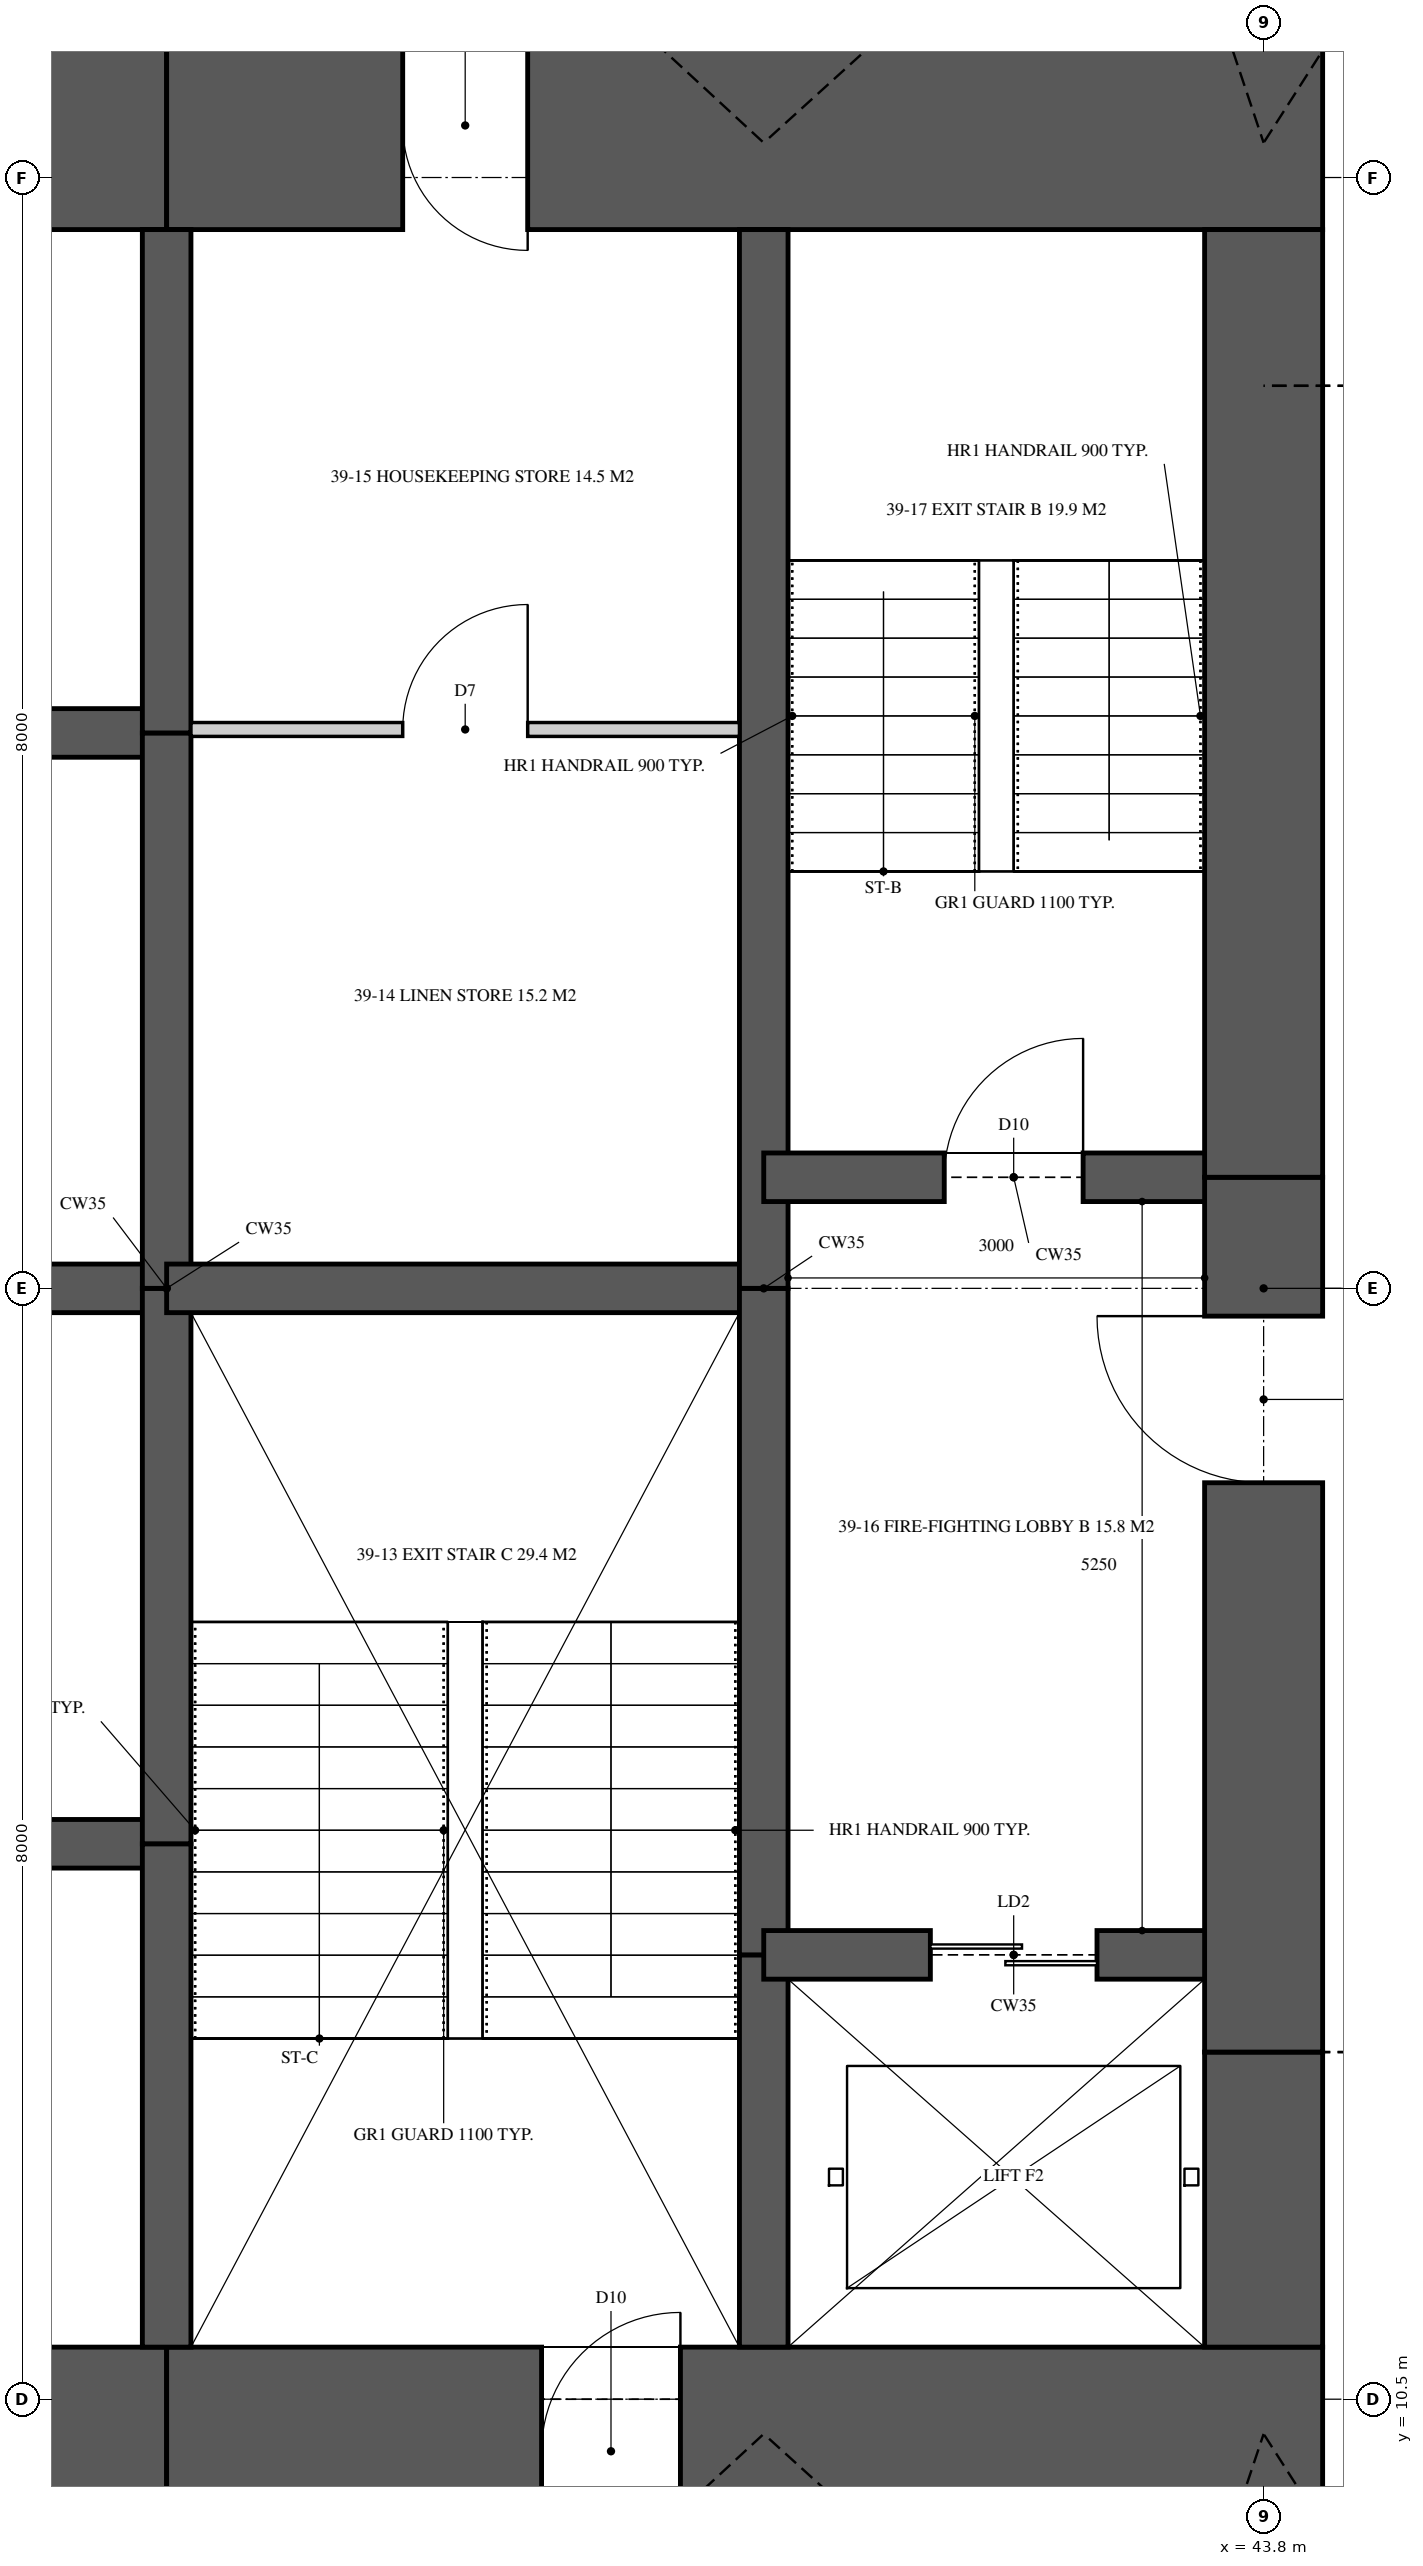
"""IFC4 building model, lengths in metres.
Left out: names, types, materials, properties, quantities, classifications, styles, units other than length and angle.
Written with IfcOpenShell. Run it as: python <this file> out.ifc"""

import sys

from ifc_helpers import new_model, si_unit, direction, frame, frame_2d, origin, place, context, subcontext, project, spatial, rectangle, extrude, element, fill, save


model = new_model("IFC4")
c1 = context("Model", 3, precision=1e-05, world=origin(), true_north=direction((0.0, 1.0)))
c2 = subcontext(c1, "Body", "Model", "MODEL_VIEW")
j1 = project(units=[si_unit("LENGTHUNIT", "METRE"), si_unit("PLANEANGLEUNIT", "RADIAN")], contexts=[c1])
p1 = place(None, origin())
s1 = spatial("IfcSite", under=j1, at=p1, CompositionType="ELEMENT")
p2 = place(p1, origin())
s2 = spatial("IfcBuilding", under=s1, at=p2, CompositionType="ELEMENT")
p3 = place(p2, frame((0.0, 0.0, 144.35)))
s3 = spatial("IfcBuildingStorey", under=s2, at=p3, CompositionType="ELEMENT", Elevation=144.35)
p4 = place(p3, frame((31.6, 10.125, 0.0), z_axis=(0.0, 0.0, 1.0), x_axis=(1.0, 0.0, 0.0)))
e1 = element("IfcWall", 1, at=p4, inside=s3, PredefinedType="SHEAR", context=c2, shape_type="SweptSolid", body=[
    extrude(rectangle(XDim=4.3, YDim=1.5, at=frame_2d((2.15, 0.0))), origin(), (0.0, 0.0, 1.0), 5.0),
])
p5 = place(p3, frame((35.9, 10.125, 0.0), z_axis=(0.0, 0.0, 1.0), x_axis=(1.0, 0.0, 0.0)))
e2 = element("IfcWall", 2, at=p5, inside=s3, PredefinedType="SHEAR", context=c2, shape_type="SweptSolid", body=[
    extrude(rectangle(XDim=8.325, YDim=1.5, at=frame_2d((4.163, 0.0))), origin(), (0.0, 0.0, 1.0), 5.0),
])
p6 = place(p5, frame((2.7, 0.0, 0.0)))
e3 = element("IfcOpeningElement", 3, at=p6, cuts=e2, PredefinedType="OPENING", context=c2, shape_type="SweptSolid", body=[
    extrude(rectangle(XDim=1.0, YDim=2.1, at=frame_2d((0.5, 1.05))), frame((0.0, 0.76, 0.0), z_axis=(0.0, -1.0, 0.0), x_axis=(1.0, 0.0, 0.0)), (0.0, 0.0, 1.0), 1.52),
])
p7 = place(p3, frame((44.225, 26.875, 0.0), z_axis=(0.0, 0.0, 1.0), x_axis=(-1.0, 0.0, 0.0)))
e4 = element("IfcWall", 4, at=p7, inside=s3, PredefinedType="SHEAR", context=c2, shape_type="SweptSolid", body=[
    extrude(rectangle(XDim=8.325, YDim=1.5, at=frame_2d((4.163, 0.0))), origin(), (0.0, 0.0, 1.0), 5.0),
])
p8 = place(p7, frame((5.725, 0.0, 0.0)))
e5 = element("IfcOpeningElement", 5, at=p8, cuts=e4, PredefinedType="OPENING", context=c2, shape_type="SweptSolid", body=[
    extrude(rectangle(XDim=0.9, YDim=2.1, at=frame_2d((0.45, 1.05))), frame((0.0, 0.76, 0.0), z_axis=(0.0, -1.0, 0.0), x_axis=(1.0, 0.0, 0.0)), (0.0, 0.0, 1.0), 1.52),
])
p9 = place(p3, frame((35.9, 26.875, 0.0), z_axis=(0.0, 0.0, 1.0), x_axis=(-1.0, 0.0, 0.0)))
e6 = element("IfcWall", 6, at=p9, inside=s3, PredefinedType="SHEAR", context=c2, shape_type="SweptSolid", body=[
    extrude(rectangle(XDim=4.3, YDim=1.5, at=frame_2d((2.15, 0.0))), origin(), (0.0, 0.0, 1.0), 5.0),
])
p10 = place(p3, frame((43.8, 10.875, 0.0), z_axis=(0.0, 0.0, 1.0), x_axis=(0.0, 1.0, 0.0)))
e7 = element("IfcWall", 7, at=p10, inside=s3, PredefinedType="SHEAR", context=c2, shape_type="SweptSolid", body=[
    extrude(rectangle(XDim=2.125, YDim=0.85, at=frame_2d((1.062, 0.0))), origin(), (0.0, 0.0, 1.0), 5.0),
])
p11 = place(p3, frame((43.8, 13.0, 0.0), z_axis=(0.0, 0.0, 1.0), x_axis=(0.0, 1.0, 0.0)))
e8 = element("IfcWall", 8, at=p11, inside=s3, PredefinedType="SHEAR", context=c2, shape_type="SweptSolid", body=[
    extrude(rectangle(XDim=6.3, YDim=0.85, at=frame_2d((3.15, 0.0))), origin(), (0.0, 0.0, 1.0), 5.0),
])
p12 = place(p11, frame((4.1, 0.0, 0.0)))
e9 = element("IfcOpeningElement", 9, at=p12, cuts=e8, PredefinedType="OPENING", context=c2, shape_type="SweptSolid", body=[
    extrude(rectangle(XDim=1.2, YDim=2.2, at=frame_2d((0.6, 1.1))), frame((0.0, 0.435, 0.0), z_axis=(0.0, -1.0, 0.0), x_axis=(1.0, 0.0, 0.0)), (0.0, 0.0, 1.0), 0.87),
])
p13 = place(p3, frame((43.8, 19.3, 0.0), z_axis=(0.0, 0.0, 1.0), x_axis=(0.0, 1.0, 0.0)))
e10 = element("IfcWall", 10, at=p13, inside=s3, PredefinedType="SHEAR", context=c2, shape_type="SweptSolid", body=[
    extrude(rectangle(XDim=6.825, YDim=0.85, at=frame_2d((3.413, 0.0))), origin(), (0.0, 0.0, 1.0), 5.0),
])
p14 = place(p3, frame((35.9, 10.875, 0.0), z_axis=(0.0, 0.0, 1.0), x_axis=(0.0, 1.0, 0.0)))
e11 = element("IfcWall", 11, at=p14, inside=s3, PredefinedType="SHEAR", context=c2, shape_type="SweptSolid", body=[
    extrude(rectangle(XDim=3.625, YDim=0.35, at=frame_2d((1.812, 0.0))), origin(), (0.0, 0.0, 1.0), 5.0),
])
for number, where, z_axis, x_axis in (
    (12, (35.9, 14.5, 0.0), (0.0, 0.0, 1.0), (0.0, 1.0, 0.0)),
    (13, (35.9, 18.5, 0.0), (0.0, 0.0, 1.0), (0.0, 1.0, 0.0)),
):
    element("IfcWall", number, at=place(p3, frame(where, z_axis=z_axis, x_axis=x_axis)), inside=s3, PredefinedType="SHEAR", context=c2, shape_type="SweptSolid", body=[
        extrude(rectangle(XDim=4.0, YDim=0.35, at=frame_2d((2.0, 0.0))), origin(), (0.0, 0.0, 1.0), 5.0),
    ])
p15 = place(p3, frame((35.9, 22.5, 0.0), z_axis=(0.0, 0.0, 1.0), x_axis=(0.0, 1.0, 0.0)))
e14 = element("IfcWall", 14, at=p15, inside=s3, PredefinedType="SHEAR", context=c2, shape_type="SweptSolid", body=[
    extrude(rectangle(XDim=3.625, YDim=0.35, at=frame_2d((1.812, 0.0))), origin(), (0.0, 0.0, 1.0), 5.0),
])
p16 = place(p3, frame((40.2, 10.875, 0.0), z_axis=(0.0, 0.0, 1.0), x_axis=(0.0, 1.0, 0.0)))
e15 = element("IfcWall", 15, at=p16, inside=s3, PredefinedType="SHEAR", context=c2, shape_type="SweptSolid", body=[
    extrude(rectangle(XDim=2.825, YDim=0.35, at=frame_2d((1.413, 0.0))), origin(), (0.0, 0.0, 1.0), 5.0),
])
p17 = place(p3, frame((40.2, 13.7, 0.0), z_axis=(0.0, 0.0, 1.0), x_axis=(0.0, 1.0, 0.0)))
e16 = element("IfcWall", 16, at=p17, inside=s3, PredefinedType="SHEAR", context=c2, shape_type="SweptSolid", body=[
    extrude(rectangle(XDim=4.8, YDim=0.35, at=frame_2d((2.4, 0.0))), origin(), (0.0, 0.0, 1.0), 5.0),
])
p18 = place(p3, frame((40.2, 18.5, 0.0), z_axis=(0.0, 0.0, 1.0), x_axis=(0.0, 1.0, 0.0)))
e17 = element("IfcWall", 17, at=p18, inside=s3, PredefinedType="SHEAR", context=c2, shape_type="SweptSolid", body=[
    extrude(rectangle(XDim=7.625, YDim=0.35, at=frame_2d((3.812, 0.0))), origin(), (0.0, 0.0, 1.0), 5.0),
])
for number, where, z_axis, x_axis in (
    (18, (31.6, 14.5, 0.0), (0.0, 0.0, 1.0), (1.0, 0.0, 0.0)),
    (19, (31.6, 18.5, 0.0), (0.0, 0.0, 1.0), (1.0, 0.0, 0.0)),
    (20, (31.6, 22.5, 0.0), (0.0, 0.0, 1.0), (1.0, 0.0, 0.0)),
):
    element("IfcWall", number, at=place(p3, frame(where, z_axis=z_axis, x_axis=x_axis)), inside=s3, PredefinedType="SHEAR", context=c2, shape_type="SweptSolid", body=[
        extrude(rectangle(XDim=4.3, YDim=0.35, at=frame_2d((2.15, 0.0))), origin(), (0.0, 0.0, 1.0), 5.0),
    ])
p19 = place(p3, frame((35.9, 18.5, 0.0), z_axis=(0.0, 0.0, 1.0), x_axis=(1.0, 0.0, 0.0)))
e21 = element("IfcWall", 21, at=p19, inside=s3, PredefinedType="SHEAR", context=c2, shape_type="SweptSolid", body=[
    extrude(rectangle(XDim=4.3, YDim=0.35, at=frame_2d((2.15, 0.0))), origin(), (0.0, 0.0, 1.0), 5.0),
])
p20 = place(p3, frame((40.2, 13.7, 0.0), z_axis=(0.0, 0.0, 1.0), x_axis=(1.0, 0.0, 0.0)))
e22 = element("IfcWall", 22, at=p20, inside=s3, PredefinedType="SHEAR", context=c2, shape_type="SweptSolid", body=[
    extrude(rectangle(XDim=3.6, YDim=0.35, at=frame_2d((1.8, 0.0))), origin(), (0.0, 0.0, 1.0), 5.0),
])
p21 = place(p20, frame((1.2, 0.0, 0.0)))
e23 = element("IfcOpeningElement", 23, at=p21, cuts=e22, PredefinedType="OPENING", context=c2, shape_type="SweptSolid", body=[
    extrude(rectangle(XDim=1.2, YDim=2.1, at=frame_2d((0.6, 1.05))), frame((0.0, 0.185, 0.0), z_axis=(0.0, -1.0, 0.0), x_axis=(1.0, 0.0, 0.0)), (0.0, 0.0, 1.0), 0.37),
])
p22 = place(p3, frame((40.2, 19.3, 0.0), z_axis=(0.0, 0.0, 1.0), x_axis=(1.0, 0.0, 0.0)))
e24 = element("IfcWall", 24, at=p22, inside=s3, PredefinedType="SHEAR", context=c2, shape_type="SweptSolid", body=[
    extrude(rectangle(XDim=3.6, YDim=0.35, at=frame_2d((1.8, 0.0))), origin(), (0.0, 0.0, 1.0), 5.0),
])
p23 = place(p22, frame((1.3, 0.0, 0.0)))
e25 = element("IfcOpeningElement", 25, at=p23, cuts=e24, PredefinedType="OPENING", context=c2, shape_type="SweptSolid", body=[
    extrude(rectangle(XDim=1.0, YDim=2.1, at=frame_2d((0.5, 1.05))), frame((0.0, 0.185, 0.0), z_axis=(0.0, -1.0, 0.0), x_axis=(1.0, 0.0, 0.0)), (0.0, 0.0, 1.0), 0.37),
])
p24 = place(p3, frame((36.075, 22.525, 0.0), z_axis=(0.0, 0.0, 1.0), x_axis=(1.0, 0.0, 0.0)))
e26 = element("IfcWall", 26, at=p24, inside=s3, PredefinedType="PARTITIONING", context=c2, shape_type="SweptSolid", body=[
    extrude(rectangle(XDim=3.95, YDim=0.1, at=frame_2d((1.975, 0.0))), origin(), (0.0, 0.0, 1.0), 4.72),
])
p25 = place(p24, frame((1.525, 0.0, 0.0)))
e27 = element("IfcOpeningElement", 27, at=p25, cuts=e26, PredefinedType="OPENING", context=c2, shape_type="SweptSolid", body=[
    extrude(rectangle(XDim=0.9, YDim=2.1, at=frame_2d((0.45, 1.05))), frame((0.0, 0.06, 0.0), z_axis=(0.0, -1.0, 0.0), x_axis=(1.0, 0.0, 0.0)), (0.0, 0.0, 1.0), 0.12),
])
p26 = place(p25, origin())
e28 = element("IfcDoor", 28, at=p26, inside=s3, OperationType="SINGLE_SWING_RIGHT", PredefinedType="DOOR", context=c2, shape_type="SweptSolid", body=[
    extrude(rectangle(XDim=0.9, YDim=2.1, at=frame_2d((0.45, 1.05))), frame((0.0, 0.025, 0.0), z_axis=(0.0, -1.0, 0.0), x_axis=(1.0, 0.0, 0.0)), (0.0, 0.0, 1.0), 0.05),
])
fill(e27, e28)
p27 = place(p23, origin())
e29 = element("IfcDoor", 29, at=p27, inside=s3, OperationType="SINGLE_SWING_RIGHT", PredefinedType="DOOR", context=c2, shape_type="SweptSolid", body=[
    extrude(rectangle(XDim=1.0, YDim=2.1, at=frame_2d((0.5, 1.05))), frame((0.0, 0.025, 0.0), z_axis=(0.0, -1.0, 0.0), x_axis=(1.0, 0.0, 0.0)), (0.0, 0.0, 1.0), 0.05),
])
fill(e25, e29)
p28 = place(p12, origin())
e30 = element("IfcDoor", 30, at=p28, inside=s3, OperationType="SINGLE_SWING_RIGHT", PredefinedType="DOOR", context=c2, shape_type="SweptSolid", body=[
    extrude(rectangle(XDim=1.2, YDim=2.2, at=frame_2d((0.6, 1.1))), frame((0.0, 0.025, 0.0), z_axis=(0.0, -1.0, 0.0), x_axis=(1.0, 0.0, 0.0)), (0.0, 0.0, 1.0), 0.05),
])
fill(e9, e30)
p29 = place(p21, origin())
e31 = element("IfcDoor", 31, at=p29, inside=s3, OperationType="SLIDING_TO_LEFT", PredefinedType="DOOR", context=c2, shape_type="SweptSolid", body=[
    extrude(rectangle(XDim=1.2, YDim=2.1, at=frame_2d((0.6, 1.05))), frame((0.0, 0.025, 0.0), z_axis=(0.0, -1.0, 0.0), x_axis=(1.0, 0.0, 0.0)), (0.0, 0.0, 1.0), 0.05),
])
fill(e23, e31)
p30 = place(p6, origin())
e32 = element("IfcDoor", 32, at=p30, inside=s3, OperationType="SINGLE_SWING_RIGHT", PredefinedType="DOOR", context=c2, shape_type="SweptSolid", body=[
    extrude(rectangle(XDim=1.0, YDim=2.1, at=frame_2d((0.5, 1.05))), frame((0.0, 0.025, 0.0), z_axis=(0.0, -1.0, 0.0), x_axis=(1.0, 0.0, 0.0)), (0.0, 0.0, 1.0), 0.05),
])
fill(e3, e32)
p31 = place(p8, origin())
e33 = element("IfcDoor", 33, at=p31, inside=s3, OperationType="SINGLE_SWING_LEFT", PredefinedType="DOOR", context=c2, shape_type="SweptSolid", body=[
    extrude(rectangle(XDim=0.9, YDim=2.1, at=frame_2d((0.45, 1.05))), frame((0.0, 0.47, 0.0), z_axis=(0.0, -1.0, 0.0), x_axis=(1.0, 0.0, 0.0)), (0.0, 0.0, 1.0), 0.8),
])
fill(e5, e33)
save(model, sys.argv[1])
